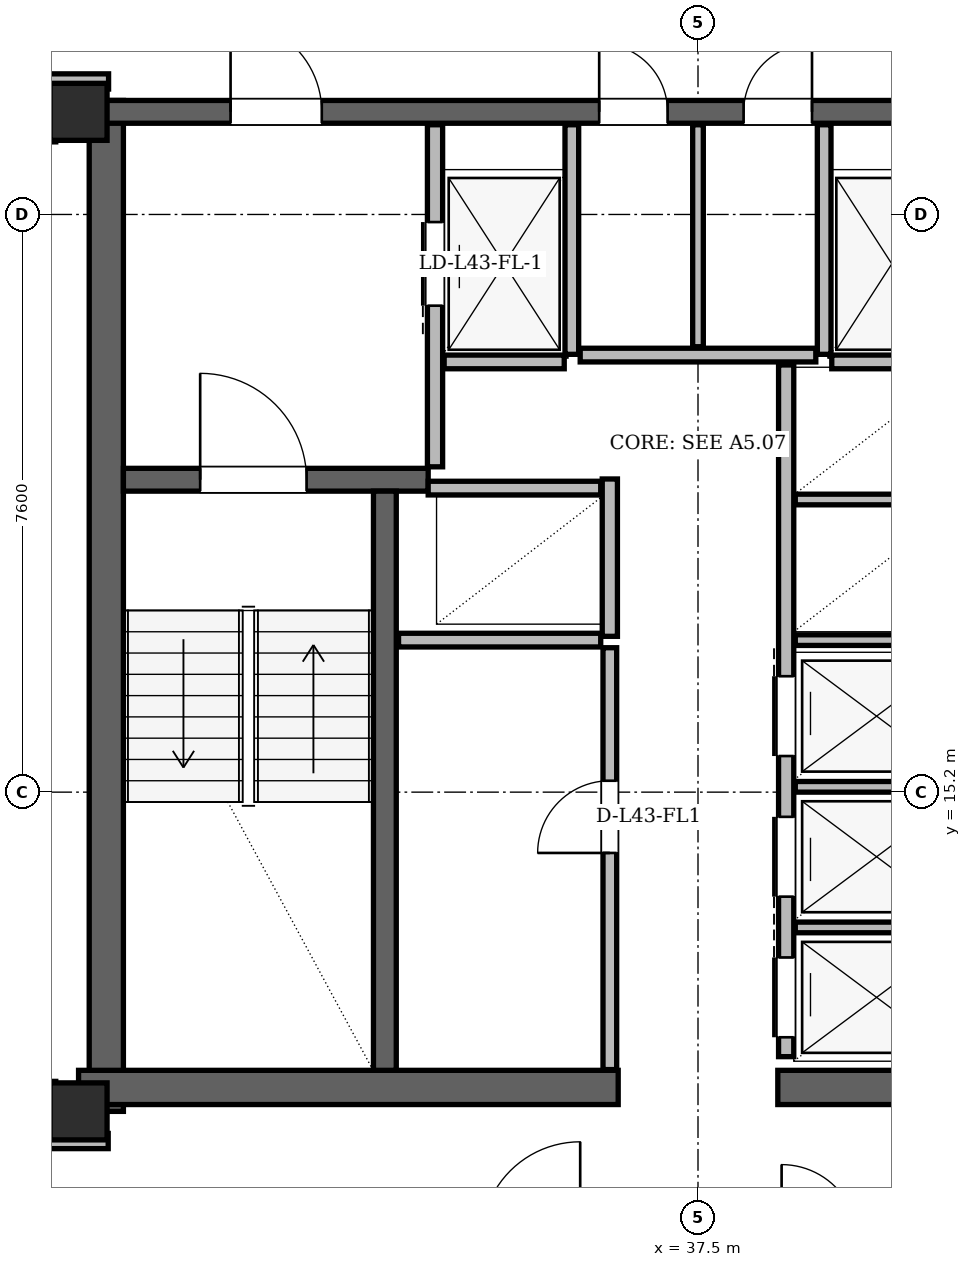
"""IFC4 building model, lengths in metres.
Left out: names, types, materials, properties, quantities, classifications, styles, units other than length and angle.
Written with IfcOpenShell. Run it as: python <this file> out.ifc"""

import sys

from ifc_helpers import new_model, si_unit, direction, frame, frame_2d, origin, origin_2d, place, context, subcontext, project, spatial, rectangle, hollow_rectangle, extrude, element, fill, save


model = new_model("IFC4")
c1 = context("Model", 3, precision=1e-05, world=origin(), true_north=direction((0.0, 1.0)))
c2 = subcontext(c1, "Body", "Model", "MODEL_VIEW")
j1 = project(units=[si_unit("LENGTHUNIT", "METRE"), si_unit("PLANEANGLEUNIT", "RADIAN")], contexts=[c1])
p1 = place(None, origin())
s1 = spatial("IfcSite", under=j1, at=p1, CompositionType="ELEMENT")
p2 = place(p1, origin())
s2 = spatial("IfcBuilding", under=s1, at=p2, CompositionType="ELEMENT")
p3 = place(p2, frame((0.0, 0.0, 163.8)))
s3 = spatial("IfcBuildingStorey", under=s2, at=p3, CompositionType="ELEMENT", Elevation=163.8)
for number, where, z_axis, x_axis in (
    (1, (29.35, 11.0, 0.0), (0.0, 0.0, 1.0), (1.0, 0.0, 0.0)),
    (2, (29.35, 24.15, 0.0), (0.0, 0.0, 1.0), (1.0, 0.0, 0.0)),
):
    element("IfcColumn", number, at=place(p3, frame(where, z_axis=z_axis, x_axis=x_axis)), inside=s3, PredefinedType="COLUMN", context=c2, shape_type="SweptSolid", body=[
        extrude(hollow_rectangle(XDim=0.75, YDim=0.75, WallThickness=0.06, at=origin_2d()), origin(), (0.0, 0.0, 1.0), 3.6),
    ])
p4 = place(p3, frame((29.715, 11.0, 0.0), z_axis=(0.0, 0.0, 1.0), x_axis=(0.0, 1.0, 0.0)))
e3 = element("IfcWall", 3, at=p4, inside=s3, PredefinedType="SHEAR", context=c2, shape_type="SweptSolid", body=[
    extrude(rectangle(XDim=13.3, YDim=0.45, at=frame_2d((6.65, 0.0))), origin(), (0.0, 0.0, 1.0), 3.38),
])
for number, where, z_axis, x_axis in (
    (4, (29.35, 11.315, 0.0), (0.0, 0.0, 1.0), (1.0, 0.0, 0.0)),
    (5, (38.55, 11.315, 0.0), (0.0, 0.0, 1.0), (1.0, 0.0, 0.0)),
):
    element("IfcWall", number, at=place(p3, frame(where, z_axis=z_axis, x_axis=x_axis)), inside=s3, PredefinedType="SHEAR", context=c2, shape_type="SweptSolid", body=[
        extrude(rectangle(XDim=7.1, YDim=0.45, at=frame_2d((3.55, 0.0))), origin(), (0.0, 0.0, 1.0), 3.38),
    ])
p5 = place(p3, frame((29.65, 24.15, 0.0), z_axis=(0.0, 0.0, 1.0), x_axis=(1.0, 0.0, 0.0)))
e6 = element("IfcWall", 6, at=p5, inside=s3, PredefinedType="SHEAR", context=c2, shape_type="SweptSolid", body=[
    extrude(rectangle(XDim=15.7, YDim=0.3, at=frame_2d((7.85, 0.0))), origin(), (0.0, 0.0, 1.0), 3.38),
])
p6 = place(p5, frame((1.7, 0.0, 0.0)))
e7 = element("IfcOpeningElement", 7, at=p6, cuts=e6, PredefinedType="OPENING", context=c2, shape_type="SweptSolid", body=[
    extrude(rectangle(XDim=1.2, YDim=2.2, at=frame_2d((0.6, 1.1))), frame((0.0, 0.15, 0.0), z_axis=(0.0, -1.0, 0.0), x_axis=(1.0, 0.0, 0.0)), (0.0, 0.0, 1.0), 0.3),
])
p7 = place(p5, frame((12.8, 0.0, 0.0)))
e8 = element("IfcOpeningElement", 8, at=p7, cuts=e6, PredefinedType="OPENING", context=c2, shape_type="SweptSolid", body=[
    extrude(rectangle(XDim=1.2, YDim=2.2, at=frame_2d((0.6, 1.1))), frame((0.0, 0.15, 0.0), z_axis=(0.0, -1.0, 0.0), x_axis=(1.0, 0.0, 0.0)), (0.0, 0.0, 1.0), 0.3),
])
p8 = place(p5, frame((6.55, 0.0, 0.0)))
e9 = element("IfcOpeningElement", 9, at=p8, cuts=e6, PredefinedType="OPENING", context=c2, shape_type="SweptSolid", body=[
    extrude(rectangle(XDim=0.9, YDim=2.05, at=frame_2d((0.45, 1.025))), frame((0.0, 0.15, 0.0), z_axis=(0.0, -1.0, 0.0), x_axis=(1.0, 0.0, 0.0)), (0.0, 0.0, 1.0), 0.3),
])
p9 = place(p5, frame((8.45, 0.0, 0.0)))
e10 = element("IfcOpeningElement", 10, at=p9, cuts=e6, PredefinedType="OPENING", context=c2, shape_type="SweptSolid", body=[
    extrude(rectangle(XDim=0.9, YDim=2.05, at=frame_2d((0.45, 1.025))), frame((0.0, 0.15, 0.0), z_axis=(0.0, -1.0, 0.0), x_axis=(1.0, 0.0, 0.0)), (0.0, 0.0, 1.0), 0.3),
])
p10 = place(p3, frame((29.94, 19.31, 0.0), z_axis=(0.0, 0.0, 1.0), x_axis=(1.0, 0.0, 0.0)))
e11 = element("IfcWall", 11, at=p10, inside=s3, PredefinedType="SHEAR", context=c2, shape_type="SweptSolid", body=[
    extrude(rectangle(XDim=4.01, YDim=0.3, at=frame_2d((2.005, 0.0))), origin(), (0.0, 0.0, 1.0), 3.38),
])
p11 = place(p10, frame((1.01, 0.0, 0.0)))
e12 = element("IfcOpeningElement", 12, at=p11, cuts=e11, PredefinedType="OPENING", context=c2, shape_type="SweptSolid", body=[
    extrude(rectangle(XDim=1.4, YDim=2.2, at=frame_2d((0.7, 1.1))), frame((0.0, 0.15, 0.0), z_axis=(0.0, -1.0, 0.0), x_axis=(1.0, 0.0, 0.0)), (0.0, 0.0, 1.0), 0.3),
])
p12 = place(p3, frame((33.38, 11.54, 0.0), z_axis=(0.0, 0.0, 1.0), x_axis=(0.0, 1.0, 0.0)))
e13 = element("IfcWall", 13, at=p12, inside=s3, PredefinedType="SHEAR", context=c2, shape_type="SweptSolid", body=[
    extrude(rectangle(XDim=7.62, YDim=0.3, at=frame_2d((3.81, 0.0))), origin(), (0.0, 0.0, 1.0), 3.38),
])
p13 = place(p3, frame((33.065, 43.294, 0.0), z_axis=(0.0, 0.0, 1.0), x_axis=(-0.499998611639, -0.866026205354, 0.0)))
e14 = element("IfcWall", 14, at=p13, inside=s3, PredefinedType="SOLIDWALL", context=c2, shape_type="SweptSolid", body=[
    extrude(rectangle(XDim=35.738, YDim=0.34, at=frame_2d((17.869, 0.0))), origin(), (0.0, 0.0, 1.0), 2.6),
])
p14 = place(p13, frame((6.76, 0.0, 0.0)))
e15 = element("IfcOpeningElement", 15, at=p14, cuts=e14, PredefinedType="OPENING", context=c2, shape_type="SweptSolid", body=[
    extrude(rectangle(XDim=1.0, YDim=2.18, at=frame_2d((0.5, 1.09))), frame((0.0, 0.17, 0.0), z_axis=(0.0, -1.0, 0.0), x_axis=(1.0, 0.0, 0.0)), (0.0, 0.0, 1.0), 0.34),
])
p15 = place(p13, frame((26.624, 0.0, 0.0)))
e16 = element("IfcOpeningElement", 16, at=p15, cuts=e14, PredefinedType="OPENING", context=c2, shape_type="SweptSolid", body=[
    extrude(rectangle(XDim=1.5, YDim=2.2, at=frame_2d((0.75, 1.1))), frame((0.0, 0.17, 0.0), z_axis=(0.0, -1.0, 0.0), x_axis=(1.0, 0.0, 0.0)), (0.0, 0.0, 1.0), 0.34),
])
p16 = place(p13, frame((33.648, 0.0, 0.85)))
e17 = element("IfcOpeningElement", 17, at=p16, cuts=e14, PredefinedType="OPENING", context=c2, shape_type="SweptSolid", body=[
    extrude(rectangle(XDim=1.2, YDim=1.48, at=frame_2d((0.6, 0.74))), frame((0.0, 0.17, 0.0), z_axis=(0.0, -1.0, 0.0), x_axis=(1.0, 0.0, 0.0)), (0.0, 0.0, 1.0), 0.34),
])
p17 = place(p13, frame((22.24, 0.0, 0.85)))
e18 = element("IfcOpeningElement", 18, at=p17, cuts=e14, PredefinedType="OPENING", context=c2, shape_type="SweptSolid", body=[
    extrude(rectangle(XDim=1.2, YDim=1.48, at=frame_2d((0.6, 0.74))), frame((0.0, 0.17, 0.0), z_axis=(0.0, -1.0, 0.0), x_axis=(1.0, 0.0, 0.0)), (0.0, 0.0, 1.0), 0.34),
])
p18 = place(p13, frame((11.751, 0.0, 0.85)))
e19 = element("IfcOpeningElement", 19, at=p18, cuts=e14, PredefinedType="OPENING", context=c2, shape_type="SweptSolid", body=[
    extrude(rectangle(XDim=2.2, YDim=1.64, at=frame_2d((1.1, 0.82))), frame((0.0, 0.17, 0.0), z_axis=(0.0, -1.0, 0.0), x_axis=(1.0, 0.0, 0.0)), (0.0, 0.0, 1.0), 0.34),
])
p19 = place(p13, frame((18.248, 0.0, 0.85)))
e20 = element("IfcOpeningElement", 20, at=p19, cuts=e14, PredefinedType="OPENING", context=c2, shape_type="SweptSolid", body=[
    extrude(rectangle(XDim=1.6, YDim=1.64, at=frame_2d((0.8, 0.82))), frame((0.0, 0.17, 0.0), z_axis=(0.0, -1.0, 0.0), x_axis=(1.0, 0.0, 0.0)), (0.0, 0.0, 1.0), 0.34),
])
p20 = place(p13, frame((1.139, 0.0, 0.85)))
e21 = element("IfcOpeningElement", 21, at=p20, cuts=e14, PredefinedType="OPENING", context=c2, shape_type="SweptSolid", body=[
    extrude(rectangle(XDim=1.8, YDim=1.64, at=frame_2d((0.9, 0.82))), frame((0.0, 0.17, 0.0), z_axis=(0.0, -1.0, 0.0), x_axis=(1.0, 0.0, 0.0)), (0.0, 0.0, 1.0), 0.34),
])
p21 = place(p13, frame((30.5, 0.0, 0.85)))
e22 = element("IfcOpeningElement", 22, at=p21, cuts=e14, PredefinedType="OPENING", context=c2, shape_type="SweptSolid", body=[
    extrude(rectangle(XDim=1.2, YDim=1.48, at=frame_2d((0.6, 0.74))), frame((0.0, 0.17, 0.0), z_axis=(0.0, -1.0, 0.0), x_axis=(1.0, 0.0, 0.0)), (0.0, 0.0, 1.0), 0.34),
])
p22 = place(p3, frame((34.04, 19.48, 0.0), z_axis=(0.0, 0.0, 1.0), x_axis=(0.0, 1.0, 0.0)))
e23 = element("IfcWall", 23, at=p22, inside=s3, PredefinedType="PARTITIONING", context=c2, shape_type="SweptSolid", body=[
    extrude(rectangle(XDim=4.5, YDim=0.2, at=frame_2d((2.25, 0.0))), origin(), (0.0, 0.0, 1.0), 2.42),
])
p23 = place(p22, frame((2.12, 0.0, 0.0)))
e24 = element("IfcOpeningElement", 24, at=p23, cuts=e23, PredefinedType="OPENING", context=c2, shape_type="SweptSolid", body=[
    extrude(rectangle(XDim=1.1, YDim=2.2, at=frame_2d((0.55, 1.1))), frame((0.0, 0.1, 0.0), z_axis=(0.0, -1.0, 0.0), x_axis=(1.0, 0.0, 0.0)), (0.0, 0.0, 1.0), 0.2),
])
p24 = place(p3, frame((35.84, 20.96, 0.0), z_axis=(0.0, 0.0, 1.0), x_axis=(0.0, 1.0, 0.0)))
e25 = element("IfcWall", 25, at=p24, inside=s3, PredefinedType="PARTITIONING", context=c2, shape_type="SweptSolid", body=[
    extrude(rectangle(XDim=3.02, YDim=0.18, at=frame_2d((1.51, 0.0))), origin(), (0.0, 0.0, 1.0), 2.42),
])
p25 = place(p3, frame((34.16, 20.86, 0.0), z_axis=(0.0, 0.0, 1.0), x_axis=(1.0, 0.0, 0.0)))
e26 = element("IfcWall", 26, at=p25, inside=s3, PredefinedType="PARTITIONING", context=c2, shape_type="SweptSolid", body=[
    extrude(rectangle(XDim=1.58, YDim=0.18, at=frame_2d((0.79, 0.0))), origin(), (0.0, 0.0, 1.0), 3.38),
])
p26 = place(p3, frame((39.16, 20.96, 0.0), z_axis=(0.0, 0.0, 1.0), x_axis=(0.0, 1.0, 0.0)))
e27 = element("IfcWall", 27, at=p26, inside=s3, PredefinedType="PARTITIONING", context=c2, shape_type="SweptSolid", body=[
    extrude(rectangle(XDim=3.02, YDim=0.18, at=frame_2d((1.51, 0.0))), origin(), (0.0, 0.0, 1.0), 2.42),
])
p27 = place(p3, frame((39.26, 20.86, 0.0), z_axis=(0.0, 0.0, 1.0), x_axis=(1.0, 0.0, 0.0)))
e28 = element("IfcWall", 28, at=p27, inside=s3, PredefinedType="PARTITIONING", context=c2, shape_type="SweptSolid", body=[
    extrude(rectangle(XDim=1.58, YDim=0.18, at=frame_2d((0.79, 0.0))), origin(), (0.0, 0.0, 1.0), 3.38),
])
p28 = place(p3, frame((36.34, 17.25, 0.0), z_axis=(0.0, 0.0, 1.0), x_axis=(0.0, 1.0, 0.0)))
e29 = element("IfcWall", 29, at=p28, inside=s3, PredefinedType="PARTITIONING", context=c2, shape_type="SweptSolid", body=[
    extrude(rectangle(XDim=2.07, YDim=0.2, at=frame_2d((1.035, 0.0))), origin(), (0.0, 0.0, 1.0), 3.38),
])
p29 = place(p3, frame((33.95, 19.2, 0.0), z_axis=(0.0, 0.0, 1.0), x_axis=(1.0, 0.0, 0.0)))
e30 = element("IfcWall", 30, at=p29, inside=s3, PredefinedType="PARTITIONING", context=c2, shape_type="SweptSolid", body=[
    extrude(rectangle(XDim=2.27, YDim=0.18, at=frame_2d((1.135, 0.0))), origin(), (0.0, 0.0, 1.0), 3.38),
])
p30 = place(p3, frame((33.56, 17.2, 0.0), z_axis=(0.0, 0.0, 1.0), x_axis=(1.0, 0.0, 0.0)))
e31 = element("IfcWall", 31, at=p30, inside=s3, PredefinedType="PARTITIONING", context=c2, shape_type="SweptSolid", body=[
    extrude(rectangle(XDim=2.66, YDim=0.18, at=frame_2d((1.33, 0.0))), origin(), (0.0, 0.0, 1.0), 3.38),
])
p31 = place(p3, frame((36.34, 11.55, 0.0), z_axis=(0.0, 0.0, 1.0), x_axis=(0.0, 1.0, 0.0)))
e32 = element("IfcWall", 32, at=p31, inside=s3, PredefinedType="PARTITIONING", context=c2, shape_type="SweptSolid", body=[
    extrude(rectangle(XDim=5.55, YDim=0.18, at=frame_2d((2.775, 0.0))), origin(), (0.0, 0.0, 1.0), 3.38),
])
p32 = place(p31, frame((2.85, 0.0, 0.0)))
e33 = element("IfcOpeningElement", 33, at=p32, cuts=e32, PredefinedType="OPENING", context=c2, shape_type="SweptSolid", body=[
    extrude(rectangle(XDim=0.95, YDim=2.1, at=frame_2d((0.475, 1.05))), frame((0.0, 0.09, 0.0), z_axis=(0.0, -1.0, 0.0), x_axis=(1.0, 0.0, 0.0)), (0.0, 0.0, 1.0), 0.18),
])
p33 = place(p3, frame((38.66, 11.72, 0.0), z_axis=(0.0, 0.0, 1.0), x_axis=(0.0, 1.0, 0.0)))
e34 = element("IfcWall", 34, at=p33, inside=s3, PredefinedType="PARTITIONING", context=c2, shape_type="SweptSolid", body=[
    extrude(rectangle(XDim=9.1, YDim=0.2, at=frame_2d((4.55, 0.0))), origin(), (0.0, 0.0, 1.0), 3.38),
])
p34 = place(p33, frame((0.255, 0.0, 0.0)))
e35 = element("IfcOpeningElement", 35, at=p34, cuts=e34, PredefinedType="OPENING", context=c2, shape_type="SweptSolid", body=[
    extrude(rectangle(XDim=1.05, YDim=2.15, at=frame_2d((0.525, 1.075))), frame((0.0, 0.1, 0.0), z_axis=(0.0, -1.0, 0.0), x_axis=(1.0, 0.0, 0.0)), (0.0, 0.0, 1.0), 0.2),
])
p35 = place(p33, frame((2.105, 0.0, 0.0)))
e36 = element("IfcOpeningElement", 36, at=p35, cuts=e34, PredefinedType="OPENING", context=c2, shape_type="SweptSolid", body=[
    extrude(rectangle(XDim=1.05, YDim=2.15, at=frame_2d((0.525, 1.075))), frame((0.0, 0.1, 0.0), z_axis=(0.0, -1.0, 0.0), x_axis=(1.0, 0.0, 0.0)), (0.0, 0.0, 1.0), 0.2),
])
p36 = place(p33, frame((3.955, 0.0, 0.0)))
e37 = element("IfcOpeningElement", 37, at=p36, cuts=e34, PredefinedType="OPENING", context=c2, shape_type="SweptSolid", body=[
    extrude(rectangle(XDim=1.05, YDim=2.15, at=frame_2d((0.525, 1.075))), frame((0.0, 0.1, 0.0), z_axis=(0.0, -1.0, 0.0), x_axis=(1.0, 0.0, 0.0)), (0.0, 0.0, 1.0), 0.2),
])
for number, where, z_axis, x_axis in (
    (38, (38.78, 13.42, 0.0), (0.0, 0.0, 1.0), (1.0, 0.0, 0.0)),
    (39, (38.78, 15.27, 0.0), (0.0, 0.0, 1.0), (1.0, 0.0, 0.0)),
    (40, (38.78, 17.2, 0.0), (0.0, 0.0, 1.0), (1.0, 0.0, 0.0)),
    (41, (38.78, 19.05, 0.0), (0.0, 0.0, 1.0), (1.0, 0.0, 0.0)),
):
    element("IfcWall", number, at=place(p3, frame(where, z_axis=z_axis, x_axis=x_axis)), inside=s3, PredefinedType="PARTITIONING", context=c2, shape_type="SweptSolid", body=[
        extrude(rectangle(XDim=2.66, YDim=0.14, at=frame_2d((1.33, 0.0))), origin(), (0.0, 0.0, 1.0), 3.38),
    ])
p37 = place(p3, frame((35.95, 20.95, 0.0), z_axis=(0.0, 0.0, 1.0), x_axis=(1.0, 0.0, 0.0)))
e42 = element("IfcWall", 42, at=p37, inside=s3, PredefinedType="PARTITIONING", context=c2, shape_type="SweptSolid", body=[
    extrude(rectangle(XDim=3.1, YDim=0.18, at=frame_2d((1.55, 0.0))), origin(), (0.0, 0.0, 1.0), 3.38),
])
p38 = place(p3, frame((37.5, 21.06, 0.0), z_axis=(0.0, 0.0, 1.0), x_axis=(0.0, 1.0, 0.0)))
e43 = element("IfcWall", 43, at=p38, inside=s3, PredefinedType="PARTITIONING", context=c2, shape_type="SweptSolid", body=[
    extrude(rectangle(XDim=2.92, YDim=0.14, at=frame_2d((1.46, 0.0))), origin(), (0.0, 0.0, 1.0), 2.42),
])
p39 = place(p3, frame((28.96, 10.61, 0.0), z_axis=(0.0, 0.0, 1.0), x_axis=(1.0, 0.0, 0.0)))
e44 = element("IfcWall", 44, at=p39, inside=s3, PredefinedType="PARTITIONING", context=c2, shape_type="SweptSolid", body=[
    extrude(rectangle(XDim=0.78, YDim=0.2, at=frame_2d((0.39, 0.0))), origin(), (0.0, 0.0, 1.0), 2.42),
])
p40 = place(p3, frame((28.955, 24.55, 0.0), z_axis=(0.0, 0.0, 1.0), x_axis=(1.0, 0.0, 0.0)))
e45 = element("IfcWall", 45, at=p40, inside=s3, PredefinedType="PARTITIONING", context=c2, shape_type="SweptSolid", body=[
    extrude(rectangle(XDim=0.79, YDim=0.2, at=frame_2d((0.395, 0.0))), origin(), (0.0, 0.0, 1.0), 2.842),
])
p41 = place(p3, frame((28.95, 10.95, 0.0), z_axis=(0.0, 0.0, 1.0), x_axis=(0.0, 1.0, 0.0)))
e46 = element("IfcWall", 46, at=p41, inside=s3, PredefinedType="PARTITIONING", context=c2, shape_type="SweptSolid", body=[
    extrude(rectangle(XDim=0.445, YDim=0.2, at=frame_2d((0.223, 0.0))), origin(), (0.0, 0.0, 1.0), 2.842),
])
p42 = place(p3, frame((28.95, 23.755, 0.0), z_axis=(0.0, 0.0, 1.0), x_axis=(0.0, 1.0, 0.0)))
e47 = element("IfcWall", 47, at=p42, inside=s3, PredefinedType="PARTITIONING", context=c2, shape_type="SweptSolid", body=[
    extrude(rectangle(XDim=0.565, YDim=0.2, at=frame_2d((0.283, 0.0))), origin(), (0.0, 0.0, 1.0), 3.38),
])
p43 = place(p32, origin())
e48 = element("IfcDoor", 48, at=p43, inside=s3, OperationType="SINGLE_SWING_LEFT", PredefinedType="DOOR", context=c2, shape_type="SweptSolid", body=[
    extrude(rectangle(XDim=0.95, YDim=2.1, at=frame_2d((0.475, 1.05))), frame((0.0, 0.025, 0.0), z_axis=(0.0, -1.0, 0.0), x_axis=(1.0, 0.0, 0.0)), (0.0, 0.0, 1.0), 0.05),
])
fill(e33, e48)
p44 = place(p23, origin())
e49 = element("IfcDoor", 49, at=p44, inside=s3, OperationType="SLIDING_TO_LEFT", PredefinedType="DOOR", context=c2, shape_type="SweptSolid", body=[
    extrude(rectangle(XDim=1.1, YDim=2.2, at=frame_2d((0.55, 1.1))), frame((0.0, 0.025, 0.0), z_axis=(0.0, -1.0, 0.0), x_axis=(1.0, 0.0, 0.0)), (0.0, 0.0, 1.0), 0.05),
])
fill(e24, e49)
p45 = place(p34, origin())
e50 = element("IfcDoor", 50, at=p45, inside=s3, OperationType="SLIDING_TO_RIGHT", PredefinedType="DOOR", context=c2, shape_type="SweptSolid", body=[
    extrude(rectangle(XDim=1.05, YDim=2.15, at=frame_2d((0.525, 1.075))), frame((0.0, 0.025, 0.0), z_axis=(0.0, -1.0, 0.0), x_axis=(1.0, 0.0, 0.0)), (0.0, 0.0, 1.0), 0.05),
])
fill(e35, e50)
p46 = place(p35, origin())
e51 = element("IfcDoor", 51, at=p46, inside=s3, OperationType="SLIDING_TO_LEFT", PredefinedType="DOOR", context=c2, shape_type="SweptSolid", body=[
    extrude(rectangle(XDim=1.05, YDim=2.15, at=frame_2d((0.525, 1.075))), frame((0.0, 0.025, 0.0), z_axis=(0.0, -1.0, 0.0), x_axis=(1.0, 0.0, 0.0)), (0.0, 0.0, 1.0), 0.05),
])
fill(e36, e51)
p47 = place(p36, origin())
e52 = element("IfcDoor", 52, at=p47, inside=s3, OperationType="SLIDING_TO_RIGHT", PredefinedType="DOOR", context=c2, shape_type="SweptSolid", body=[
    extrude(rectangle(XDim=1.05, YDim=2.15, at=frame_2d((0.525, 1.075))), frame((0.0, 0.025, 0.0), z_axis=(0.0, -1.0, 0.0), x_axis=(1.0, 0.0, 0.0)), (0.0, 0.0, 1.0), 0.05),
])
fill(e37, e52)
p48 = place(p11, origin())
e53 = element("IfcDoor", 53, at=p48, inside=s3, OperationType="SINGLE_SWING_LEFT", PredefinedType="DOOR", context=c2, shape_type="SweptSolid", body=[
    extrude(rectangle(XDim=1.4, YDim=2.2, at=frame_2d((0.7, 1.1))), frame((0.0, 0.025, 0.0), z_axis=(0.0, -1.0, 0.0), x_axis=(1.0, 0.0, 0.0)), (0.0, 0.0, 1.0), 0.05),
])
fill(e12, e53)
p49 = place(p6, origin())
e54 = element("IfcDoor", 54, at=p49, inside=s3, OperationType="SINGLE_SWING_LEFT", PredefinedType="DOOR", context=c2, shape_type="SweptSolid", body=[
    extrude(rectangle(XDim=1.2, YDim=2.2, at=frame_2d((0.6, 1.1))), frame((0.0, 0.025, 0.0), z_axis=(0.0, -1.0, 0.0), x_axis=(1.0, 0.0, 0.0)), (0.0, 0.0, 1.0), 0.05),
])
fill(e7, e54)
p50 = place(p8, origin())
e55 = element("IfcDoor", 55, at=p50, inside=s3, OperationType="SINGLE_SWING_LEFT", PredefinedType="DOOR", context=c2, shape_type="SweptSolid", body=[
    extrude(rectangle(XDim=0.9, YDim=2.05, at=frame_2d((0.45, 1.025))), frame((0.0, 0.025, 0.0), z_axis=(0.0, -1.0, 0.0), x_axis=(1.0, 0.0, 0.0)), (0.0, 0.0, 1.0), 0.05),
])
fill(e9, e55)
p51 = place(p9, origin())
e56 = element("IfcDoor", 56, at=p51, inside=s3, OperationType="SINGLE_SWING_RIGHT", PredefinedType="DOOR", context=c2, shape_type="SweptSolid", body=[
    extrude(rectangle(XDim=0.9, YDim=2.05, at=frame_2d((0.45, 1.025))), frame((0.0, 0.025, 0.0), z_axis=(0.0, -1.0, 0.0), x_axis=(1.0, 0.0, 0.0)), (0.0, 0.0, 1.0), 0.05),
])
fill(e10, e56)
save(model, sys.argv[1])
